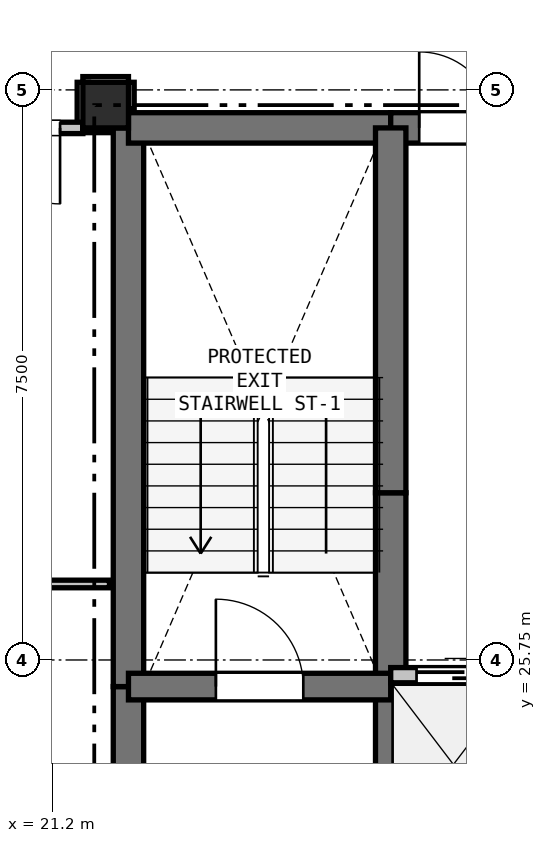
"""IFC4 building model, lengths in metres.
Left out: names, types, materials, properties, quantities, classifications, styles, units other than length and angle.
Written with IfcOpenShell. Run it as: python <this file> out.ifc"""

import sys

from ifc_helpers import new_model, si_unit, direction, frame, frame_2d, origin, origin_2d, place, context, subcontext, project, spatial, rectangle, extrude, element, fill, save


model = new_model("IFC4")
c1 = context("Model", 3, precision=1e-05, world=origin(), true_north=direction((0.0, 1.0)))
c2 = subcontext(c1, "Body", "Model", "MODEL_VIEW")
j1 = project(units=[si_unit("LENGTHUNIT", "METRE"), si_unit("PLANEANGLEUNIT", "RADIAN")], contexts=[c1])
p1 = place(None, origin())
s1 = spatial("IfcSite", under=j1, at=p1, CompositionType="ELEMENT")
p2 = place(p1, origin())
s2 = spatial("IfcBuilding", under=s1, at=p2, CompositionType="ELEMENT")
p3 = place(p2, frame((0.0, 0.0, 205.2)))
s3 = spatial("IfcBuildingStorey", under=s2, at=p3, CompositionType="ELEMENT", Elevation=205.2)
p4 = place(p3, frame((21.9, 33.05, 0.0), z_axis=(0.0, 0.0, 1.0), x_axis=(1.0, 0.0, 0.0)))
e1 = element("IfcColumn", 1, at=p4, inside=s3, PredefinedType="COLUMN", context=c2, shape_type="SweptSolid", body=[
    extrude(rectangle(XDim=0.6, YDim=0.6, at=origin_2d()), origin(), (0.0, 0.0, 1.0), 3.3),
])
p5 = place(p3, frame((22.2, 20.75, 0.0), z_axis=(0.0, 0.0, 1.0), x_axis=(0.0, 1.0, 0.0)))
e2 = element("IfcWall", 2, at=p5, inside=s3, PredefinedType="SHEAR", context=c2, shape_type="SweptSolid", body=[
    extrude(rectangle(XDim=4.65, YDim=0.4, at=frame_2d((2.325, 0.0))), origin(), (0.0, 0.0, 1.0), 3.07),
])
p6 = place(p3, frame((22.2, 25.4, 0.0), z_axis=(0.0, 0.0, 1.0), x_axis=(0.0, 1.0, 0.0)))
e3 = element("IfcWall", 3, at=p6, inside=s3, PredefinedType="SHEAR", context=c2, shape_type="SweptSolid", body=[
    extrude(rectangle(XDim=7.35, YDim=0.4, at=frame_2d((3.675, 0.0))), origin(), (0.0, 0.0, 1.0), 3.07),
])
p7 = place(p3, frame((22.2, 32.75, 0.0), z_axis=(0.0, 0.0, 1.0), x_axis=(1.0, 0.0, 0.0)))
e4 = element("IfcWall", 4, at=p7, inside=s3, PredefinedType="SHEAR", context=c2, shape_type="SweptSolid", body=[
    extrude(rectangle(XDim=3.45, YDim=0.4, at=frame_2d((1.725, 0.0))), origin(), (0.0, 0.0, 1.0), 3.07),
])
p8 = place(p3, frame((25.65, 32.75, 0.0), z_axis=(0.0, 0.0, 1.0), x_axis=(1.0, 0.0, 0.0)))
e5 = element("IfcWall", 5, at=p8, inside=s3, PredefinedType="SHEAR", context=c2, shape_type="SweptSolid", body=[
    extrude(rectangle(XDim=1.75, YDim=0.4, at=frame_2d((0.875, 0.0))), origin(), (0.0, 0.0, 1.0), 3.07),
])
p9 = place(p8, frame((0.375, 0.0, 0.0)))
e6 = element("IfcOpeningElement", 6, at=p9, cuts=e5, PredefinedType="OPENING", context=c2, shape_type="SweptSolid", body=[
    extrude(rectangle(XDim=1.0, YDim=2.15, at=frame_2d((0.5, 1.075))), frame((0.0, 0.21, 0.0), z_axis=(0.0, -1.0, 0.0), x_axis=(1.0, 0.0, 0.0)), (0.0, 0.0, 1.0), 0.42),
])
p10 = place(p3, frame((25.65, 22.75, 0.0), z_axis=(0.0, 0.0, 1.0), x_axis=(0.0, 1.0, 0.0)))
e7 = element("IfcWall", 7, at=p10, inside=s3, PredefinedType="SHEAR", context=c2, shape_type="SweptSolid", body=[
    extrude(rectangle(XDim=2.8, YDim=0.4, at=frame_2d((1.4, 0.0))), origin(), (0.0, 0.0, 1.0), 3.07),
])
p11 = place(p3, frame((25.65, 25.55, 0.0), z_axis=(0.0, 0.0, 1.0), x_axis=(0.0, 1.0, 0.0)))
e8 = element("IfcWall", 8, at=p11, inside=s3, PredefinedType="SHEAR", context=c2, shape_type="SweptSolid", body=[
    extrude(rectangle(XDim=2.4, YDim=0.4, at=frame_2d((1.2, 0.0))), origin(), (0.0, 0.0, 1.0), 3.07),
])
p12 = place(p3, frame((25.65, 27.95, 0.0), z_axis=(0.0, 0.0, 1.0), x_axis=(0.0, 1.0, 0.0)))
e9 = element("IfcWall", 9, at=p12, inside=s3, PredefinedType="SHEAR", context=c2, shape_type="SweptSolid", body=[
    extrude(rectangle(XDim=4.8, YDim=0.4, at=frame_2d((2.4, 0.0))), origin(), (0.0, 0.0, 1.0), 3.07),
])
p13 = place(p3, frame((22.2, 25.4, 0.0), z_axis=(0.0, 0.0, 1.0), x_axis=(1.0, 0.0, 0.0)))
e10 = element("IfcWall", 10, at=p13, inside=s3, PredefinedType="SHEAR", context=c2, shape_type="SweptSolid", body=[
    extrude(rectangle(XDim=3.45, YDim=0.35, at=frame_2d((1.725, 0.0))), origin(), (0.0, 0.0, 1.0), 3.07),
])
p14 = place(p13, frame((1.15, 0.0, 0.0)))
e11 = element("IfcOpeningElement", 11, at=p14, cuts=e10, PredefinedType="OPENING", context=c2, shape_type="SweptSolid", body=[
    extrude(rectangle(XDim=1.15, YDim=2.15, at=frame_2d((0.575, 1.075))), frame((0.0, 0.185, 0.0), z_axis=(0.0, -1.0, 0.0), x_axis=(1.0, 0.0, 0.0)), (0.0, 0.0, 1.0), 0.37),
])
p15 = place(p3, frame((25.65, 25.55, 0.0), z_axis=(0.0, 0.0, 1.0), x_axis=(1.0, 0.0, 0.0)))
e12 = element("IfcWall", 12, at=p15, inside=s3, PredefinedType="PARTITIONING", context=c2, shape_type="SweptSolid", body=[
    extrude(rectangle(XDim=4.95, YDim=0.2, at=frame_2d((2.475, 0.0))), origin(), (0.0, 0.0, 1.0), 3.07),
])
p16 = place(p15, frame((0.34, 0.0, 0.0)))
e13 = element("IfcOpeningElement", 13, at=p16, cuts=e12, PredefinedType="OPENING", context=c2, shape_type="SweptSolid", body=[
    extrude(rectangle(XDim=1.1, YDim=2.15, at=frame_2d((0.55, 1.075))), frame((0.0, 0.11, 0.0), z_axis=(0.0, -1.0, 0.0), x_axis=(1.0, 0.0, 0.0)), (0.0, 0.0, 1.0), 0.22),
])
p17 = place(p15, frame((1.99, 0.0, 0.0)))
e14 = element("IfcOpeningElement", 14, at=p17, cuts=e12, PredefinedType="OPENING", context=c2, shape_type="SweptSolid", body=[
    extrude(rectangle(XDim=1.1, YDim=2.15, at=frame_2d((0.55, 1.075))), frame((0.0, 0.11, 0.0), z_axis=(0.0, -1.0, 0.0), x_axis=(1.0, 0.0, 0.0)), (0.0, 0.0, 1.0), 0.22),
])
p18 = place(p15, frame((3.64, 0.0, 0.0)))
e15 = element("IfcOpeningElement", 15, at=p18, cuts=e12, PredefinedType="OPENING", context=c2, shape_type="SweptSolid", body=[
    extrude(rectangle(XDim=1.1, YDim=2.15, at=frame_2d((0.55, 1.075))), frame((0.0, 0.11, 0.0), z_axis=(0.0, -1.0, 0.0), x_axis=(1.0, 0.0, 0.0)), (0.0, 0.0, 1.0), 0.22),
])
p19 = place(p3, frame((22.2, 33.0, 0.0), z_axis=(0.0, 0.0, 1.0), x_axis=(0.0, 1.0, 0.0)))
e16 = element("IfcWall", 16, at=p19, inside=s3, PredefinedType="PARTITIONING", context=c2, shape_type="SweptSolid", body=[
    extrude(rectangle(XDim=0.35, YDim=0.15, at=frame_2d((0.175, 0.0))), origin(), (0.0, 0.0, 1.0), 2.595),
])
p20 = place(p3, frame((22.2, 33.35, 0.0), z_axis=(0.0, 0.0, 1.0), x_axis=(-1.0, 0.0, 0.0)))
e17 = element("IfcWall", 17, at=p20, inside=s3, PredefinedType="PARTITIONING", context=c2, shape_type="SweptSolid", body=[
    extrude(rectangle(XDim=0.6, YDim=0.15, at=frame_2d((0.3, 0.0))), origin(), (0.0, 0.0, 1.0), 3.07),
])
p21 = place(p3, frame((21.6, 33.35, 0.0), z_axis=(0.0, 0.0, 1.0), x_axis=(0.0, -1.0, 0.0)))
e18 = element("IfcWall", 18, at=p21, inside=s3, PredefinedType="PARTITIONING", context=c2, shape_type="SweptSolid", body=[
    extrude(rectangle(XDim=0.6, YDim=0.15, at=frame_2d((0.3, 0.0))), origin(), (0.0, 0.0, 1.0), 2.518),
])
p22 = place(p3, frame((21.6, 32.75, 0.0), z_axis=(0.0, 0.0, 1.0), x_axis=(-1.0, 0.0, 0.0)))
e19 = element("IfcWall", 19, at=p22, inside=s3, PredefinedType="PARTITIONING", context=c2, shape_type="SweptSolid", body=[
    extrude(rectangle(XDim=1.6, YDim=0.15, at=frame_2d((0.8, 0.0))), origin(), (0.0, 0.0, 1.0), 2.518),
])
p23 = place(p22, frame((0.3, 0.0, 0.0)))
e20 = element("IfcOpeningElement", 20, at=p23, cuts=e19, PredefinedType="OPENING", context=c2, shape_type="SweptSolid", body=[
    extrude(rectangle(XDim=1.0, YDim=2.15, at=frame_2d((0.5, 1.075))), frame((0.0, 0.085, 0.0), z_axis=(0.0, -1.0, 0.0), x_axis=(1.0, 0.0, 0.0)), (0.0, 0.0, 1.0), 0.17),
])
p24 = place(p3, frame((21.6, 32.75, 0.0), z_axis=(0.0, 0.0, 1.0), x_axis=(1.0, 0.0, 0.0)))
e21 = element("IfcWall", 21, at=p24, inside=s3, PredefinedType="PARTITIONING", context=c2, shape_type="SweptSolid", body=[
    extrude(rectangle(XDim=0.35, YDim=0.125, at=frame_2d((0.175, 0.0))), origin(), (0.0, 0.0, 1.0), 2.595),
])
p25 = place(p3, frame((21.95, 26.75, 0.0), z_axis=(0.0, 0.0, 1.0), x_axis=(-1.0, 0.0, 0.0)))
e22 = element("IfcWall", 22, at=p25, inside=s3, PredefinedType="PARTITIONING", context=c2, shape_type="SweptSolid", body=[
    extrude(rectangle(XDim=12.506, YDim=0.1, at=frame_2d((6.253, 0.0))), origin(), (0.0, 0.0, 1.0), 2.595),
])
p26 = place(p16, origin())
e23 = element("IfcDoor", 23, at=p26, inside=s3, OperationType="SLIDING_TO_LEFT", PredefinedType="DOOR", context=c2, shape_type="SweptSolid", body=[
    extrude(rectangle(XDim=1.1, YDim=2.15, at=frame_2d((0.55, 1.075))), frame((0.0, 0.025, 0.0), z_axis=(0.0, -1.0, 0.0), x_axis=(1.0, 0.0, 0.0)), (0.0, 0.0, 1.0), 0.05),
])
fill(e13, e23)
p27 = place(p9, origin())
e24 = element("IfcDoor", 24, at=p27, inside=s3, OperationType="SINGLE_SWING_LEFT", PredefinedType="DOOR", context=c2, shape_type="SweptSolid", body=[
    extrude(rectangle(XDim=1.0, YDim=2.15, at=frame_2d((0.5, 1.075))), frame((0.0, 0.025, 0.0), z_axis=(0.0, -1.0, 0.0), x_axis=(1.0, 0.0, 0.0)), (0.0, 0.0, 1.0), 0.05),
])
fill(e6, e24)
p28 = place(p14, origin())
e25 = element("IfcDoor", 25, at=p28, inside=s3, OperationType="SINGLE_SWING_LEFT", PredefinedType="DOOR", context=c2, shape_type="SweptSolid", body=[
    extrude(rectangle(XDim=1.15, YDim=2.15, at=frame_2d((0.575, 1.075))), frame((0.0, 0.025, 0.0), z_axis=(0.0, -1.0, 0.0), x_axis=(1.0, 0.0, 0.0)), (0.0, 0.0, 1.0), 0.05),
])
fill(e11, e25)
p29 = place(p23, origin())
e26 = element("IfcDoor", 26, at=p29, inside=s3, OperationType="SINGLE_SWING_LEFT", PredefinedType="DOOR", context=c2, shape_type="SweptSolid", body=[
    extrude(rectangle(XDim=1.0, YDim=2.15, at=frame_2d((0.5, 1.075))), frame((0.0, 0.025, 0.0), z_axis=(0.0, -1.0, 0.0), x_axis=(1.0, 0.0, 0.0)), (0.0, 0.0, 1.0), 0.05),
])
fill(e20, e26)
save(model, sys.argv[1])
